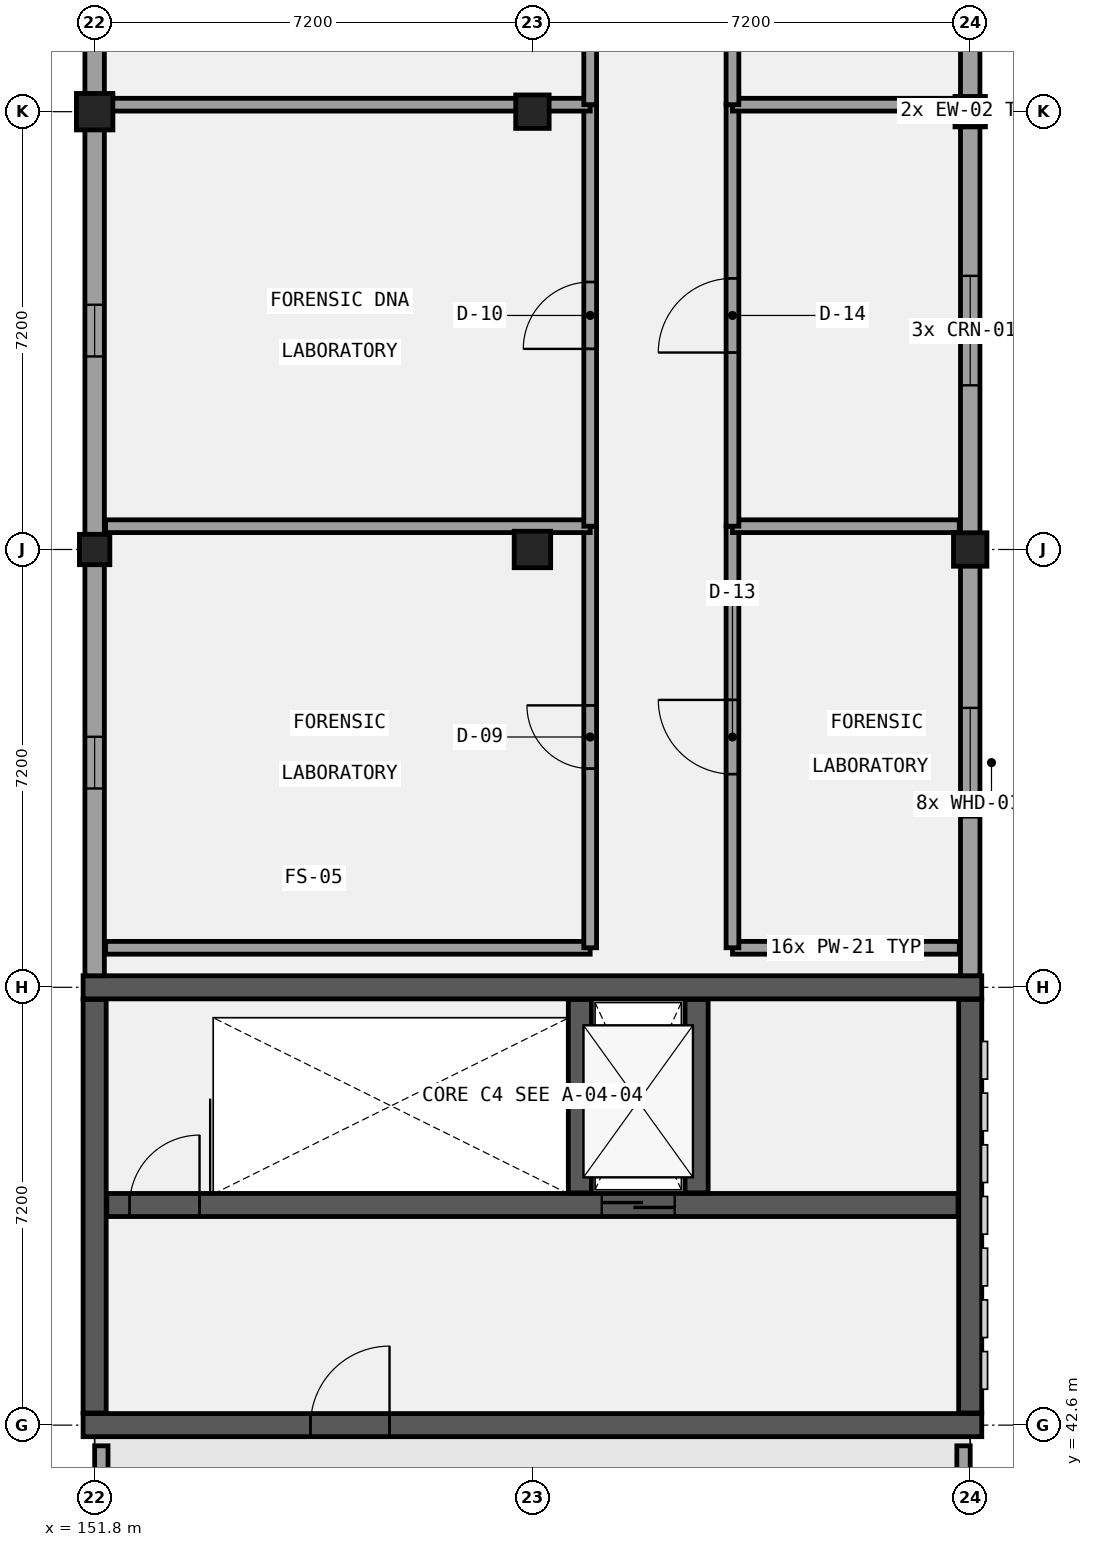
"""IFC4 building model, lengths in metres.
Left out: names, types, materials, properties, quantities, classifications, styles, units other than length and angle.
Written with IfcOpenShell. Run it as: python <this file> out.ifc"""

import sys

from ifc_helpers import new_model, si_unit, direction, frame, frame_2d, origin, origin_2d, place, context, subcontext, project, spatial, rectangle, extrude, element, fill, save


model = new_model("IFC4")
c1 = context("Model", 3, precision=1e-05, world=origin(), true_north=direction((0.0, 1.0)))
c2 = subcontext(c1, "Body", "Model", "MODEL_VIEW")
j1 = project(units=[si_unit("LENGTHUNIT", "METRE"), si_unit("PLANEANGLEUNIT", "RADIAN")], contexts=[c1])
p1 = place(None, origin())
s1 = spatial("IfcSite", under=j1, at=p1, CompositionType="ELEMENT")
p2 = place(p1, origin())
s2 = spatial("IfcBuilding", under=s1, at=p2, CompositionType="ELEMENT")
p3 = place(p2, frame((0.0, 0.0, 18.0)))
s3 = spatial("IfcBuildingStorey", under=s2, at=p3, CompositionType="ELEMENT", Elevation=18.0)
p4 = place(p3, frame((151.61, 49.8, 0.0), z_axis=(0.0, 0.0, 1.0), x_axis=(1.0, 0.0, 0.0)))
e1 = element("IfcWall", 1, at=p4, inside=s3, PredefinedType="SHEAR", context=c2, shape_type="SweptSolid", body=[
    extrude(rectangle(XDim=14.78, YDim=0.38, at=frame_2d((7.39, 0.0))), origin(), (0.0, 0.0, 1.0), 4.2),
])
p5 = place(p3, frame((151.61, 42.6, 0.0), z_axis=(0.0, 0.0, 1.0), x_axis=(1.0, 0.0, 0.0)))
e2 = element("IfcWall", 2, at=p5, inside=s3, PredefinedType="SHEAR", context=c2, shape_type="SweptSolid", body=[
    extrude(rectangle(XDim=14.78, YDim=0.38, at=frame_2d((7.39, 0.0))), origin(), (0.0, 0.0, 1.0), 4.2),
])
p6 = place(p5, frame((3.74, 0.0, 0.0)))
e3 = element("IfcOpeningElement", 3, at=p6, cuts=e2, PredefinedType="OPENING", context=c2, shape_type="SweptSolid", body=[
    extrude(rectangle(XDim=1.3, YDim=2.2, at=frame_2d((0.65, 1.1))), frame((0.0, 0.2, 0.0), z_axis=(0.0, -1.0, 0.0), x_axis=(1.0, 0.0, 0.0)), (0.0, 0.0, 1.0), 0.4),
])
for number, where, z_axis, x_axis in (
    (4, (151.8, 42.8, 0.0), (0.0, 0.0, 1.0), (0.0, 1.0, 0.0)),
    (5, (166.2, 42.8, 0.0), (0.0, 0.0, 1.0), (0.0, 1.0, 0.0)),
):
    element("IfcWall", number, at=place(p3, frame(where, z_axis=z_axis, x_axis=x_axis)), inside=s3, PredefinedType="SHEAR", context=c2, shape_type="SweptSolid", body=[
        extrude(rectangle(XDim=6.8, YDim=0.38, at=frame_2d((3.4, 0.0))), origin(), (0.0, 0.0, 1.0), 4.2),
    ])
p7 = place(p3, frame((152.0, 46.22, 0.0), z_axis=(0.0, 0.0, 1.0), x_axis=(1.0, 0.0, 0.0)))
e6 = element("IfcWall", 6, at=p7, inside=s3, PredefinedType="SHEAR", context=c2, shape_type="SweptSolid", body=[
    extrude(rectangle(XDim=14.0, YDim=0.38, at=frame_2d((7.0, 0.0))), origin(), (0.0, 0.0, 1.0), 4.2),
])
p8 = place(p7, frame((8.14, 0.0, 0.0)))
e7 = element("IfcOpeningElement", 7, at=p8, cuts=e6, PredefinedType="OPENING", context=c2, shape_type="SweptSolid", body=[
    extrude(rectangle(XDim=1.2, YDim=2.15, at=frame_2d((0.6, 1.075))), frame((0.0, 0.2, 0.0), z_axis=(0.0, -1.0, 0.0), x_axis=(1.0, 0.0, 0.0)), (0.0, 0.0, 1.0), 0.4),
])
p9 = place(p7, frame((0.375, 0.0, 0.0)))
e8 = element("IfcOpeningElement", 8, at=p9, cuts=e6, PredefinedType="OPENING", context=c2, shape_type="SweptSolid", body=[
    extrude(rectangle(XDim=1.15, YDim=2.15, at=frame_2d((0.575, 1.075))), frame((0.0, 0.2, 0.0), z_axis=(0.0, -1.0, 0.0), x_axis=(1.0, 0.0, 0.0)), (0.0, 0.0, 1.0), 0.4),
])
for number, where, z_axis, x_axis in (
    (9, (159.78, 46.42, 0.0), (0.0, 0.0, 1.0), (0.0, 1.0, 0.0)),
    (10, (161.7, 46.42, 0.0), (0.0, 0.0, 1.0), (0.0, 1.0, 0.0)),
):
    element("IfcWall", number, at=place(p3, frame(where, z_axis=z_axis, x_axis=x_axis)), inside=s3, PredefinedType="SHEAR", context=c2, shape_type="SweptSolid", body=[
        extrude(rectangle(XDim=3.18, YDim=0.38, at=frame_2d((1.59, 0.0))), origin(), (0.0, 0.0, 1.0), 4.2),
    ])
p10 = place(p3, frame((151.8, 57.0, 0.0), z_axis=(0.0, 0.0, 1.0), x_axis=(1.0, 0.0, 0.0)))
e11 = element("IfcColumn", 11, at=p10, inside=s3, PredefinedType="COLUMN", context=c2, shape_type="SweptSolid", body=[
    extrude(rectangle(XDim=0.5, YDim=0.5, at=origin_2d()), origin(), (0.0, 0.0, 1.0), 4.2),
])
for number, where, z_axis, x_axis in (
    (12, (151.8, 64.2, 0.0), (0.0, 0.0, 1.0), (1.0, 0.0, 0.0)),
    (13, (159.0, 57.0, 0.0), (0.0, 0.0, 1.0), (1.0, 0.0, 0.0)),
):
    element("IfcColumn", number, at=place(p3, frame(where, z_axis=z_axis, x_axis=x_axis)), inside=s3, PredefinedType="COLUMN", context=c2, shape_type="SweptSolid", body=[
        extrude(rectangle(XDim=0.6, YDim=0.6, at=origin_2d()), origin(), (0.0, 0.0, 1.0), 4.2),
    ])
for number, where, z_axis, x_axis in (
    (14, (159.0, 64.2, 0.0), (0.0, 0.0, 1.0), (1.0, 0.0, 0.0)),
    (15, (166.2, 57.0, 0.0), (0.0, 0.0, 1.0), (1.0, 0.0, 0.0)),
):
    element("IfcColumn", number, at=place(p3, frame(where, z_axis=z_axis, x_axis=x_axis)), inside=s3, PredefinedType="COLUMN", context=c2, shape_type="SweptSolid", body=[
        extrude(rectangle(XDim=0.55, YDim=0.55, at=origin_2d()), origin(), (0.0, 0.0, 1.0), 4.2),
    ])
p11 = place(p3, frame((166.2, 64.2, 0.0), z_axis=(0.0, 0.0, 1.0), x_axis=(1.0, 0.0, 0.0)))
e16 = element("IfcColumn", 16, at=p11, inside=s3, PredefinedType="COLUMN", context=c2, shape_type="SweptSolid", body=[
    extrude(rectangle(XDim=0.5, YDim=0.5, at=origin_2d()), origin(), (0.0, 0.0, 1.0), 4.2),
])
p12 = place(p3, frame((151.8, 78.44, 0.0), z_axis=(0.0, 0.0, 1.0), x_axis=(0.0, -1.0, 0.0)))
e17 = element("IfcWall", 17, at=p12, inside=s3, PredefinedType="SOLIDWALL", context=c2, shape_type="SweptSolid", body=[
    extrude(rectangle(XDim=28.45, YDim=0.32, at=frame_2d((14.225, 0.0))), origin(), (0.0, 0.0, 1.0), 3.19),
])
p13 = place(p12, frame((24.52, 0.0, 1.0)))
e18 = element("IfcOpeningElement", 18, at=p13, cuts=e17, PredefinedType="OPENING", context=c2, shape_type="SweptSolid", body=[
    extrude(rectangle(XDim=0.85, YDim=1.65, at=frame_2d((0.425, 0.825))), frame((0.0, 0.17, 0.0), z_axis=(0.0, -1.0, 0.0), x_axis=(1.0, 0.0, 0.0)), (0.0, 0.0, 1.0), 0.34),
])
p14 = place(p12, frame((17.415, 0.0, 1.0)))
e19 = element("IfcOpeningElement", 19, at=p14, cuts=e17, PredefinedType="OPENING", context=c2, shape_type="SweptSolid", body=[
    extrude(rectangle(XDim=0.85, YDim=1.65, at=frame_2d((0.425, 0.825))), frame((0.0, 0.17, 0.0), z_axis=(0.0, -1.0, 0.0), x_axis=(1.0, 0.0, 0.0)), (0.0, 0.0, 1.0), 0.34),
])
p15 = place(p12, frame((10.215, 0.0, 1.0)))
e20 = element("IfcOpeningElement", 20, at=p15, cuts=e17, PredefinedType="OPENING", context=c2, shape_type="SweptSolid", body=[
    extrude(rectangle(XDim=0.85, YDim=1.65, at=frame_2d((0.425, 0.825))), frame((0.0, 0.17, 0.0), z_axis=(0.0, -1.0, 0.0), x_axis=(1.0, 0.0, 0.0)), (0.0, 0.0, 1.0), 0.34),
])
p16 = place(p12, frame((3.095, 0.0, 1.0)))
e21 = element("IfcOpeningElement", 21, at=p16, cuts=e17, PredefinedType="OPENING", context=c2, shape_type="SweptSolid", body=[
    extrude(rectangle(XDim=0.85, YDim=1.65, at=frame_2d((0.425, 0.825))), frame((0.0, 0.17, 0.0), z_axis=(0.0, -1.0, 0.0), x_axis=(1.0, 0.0, 0.0)), (0.0, 0.0, 1.0), 0.34),
])
p17 = place(p3, frame((166.2, 49.99, 0.0), z_axis=(0.0, 0.0, 1.0), x_axis=(0.0, 1.0, 0.0)))
e22 = element("IfcWall", 22, at=p17, inside=s3, PredefinedType="SOLIDWALL", context=c2, shape_type="SweptSolid", body=[
    extrude(rectangle(XDim=28.45, YDim=0.32, at=frame_2d((14.225, 0.0))), origin(), (0.0, 0.0, 1.0), 3.09),
])
p18 = place(p17, frame((2.605, 0.0, 1.0)))
e23 = element("IfcOpeningElement", 23, at=p18, cuts=e22, PredefinedType="OPENING", context=c2, shape_type="SweptSolid", body=[
    extrude(rectangle(XDim=1.8, YDim=1.4, at=frame_2d((0.9, 0.7))), frame((0.0, 0.17, 0.0), z_axis=(0.0, -1.0, 0.0), x_axis=(1.0, 0.0, 0.0)), (0.0, 0.0, 1.0), 0.34),
])
p19 = place(p17, frame((9.71, 0.0, 1.0)))
e24 = element("IfcOpeningElement", 24, at=p19, cuts=e22, PredefinedType="OPENING", context=c2, shape_type="SweptSolid", body=[
    extrude(rectangle(XDim=1.8, YDim=1.4, at=frame_2d((0.9, 0.7))), frame((0.0, 0.17, 0.0), z_axis=(0.0, -1.0, 0.0), x_axis=(1.0, 0.0, 0.0)), (0.0, 0.0, 1.0), 0.34),
])
p20 = place(p17, frame((16.91, 0.0, 1.0)))
e25 = element("IfcOpeningElement", 25, at=p20, cuts=e22, PredefinedType="OPENING", context=c2, shape_type="SweptSolid", body=[
    extrude(rectangle(XDim=1.8, YDim=1.4, at=frame_2d((0.9, 0.7))), frame((0.0, 0.17, 0.0), z_axis=(0.0, -1.0, 0.0), x_axis=(1.0, 0.0, 0.0)), (0.0, 0.0, 1.0), 0.34),
])
p21 = place(p17, frame((24.03, 0.0, 1.0)))
e26 = element("IfcOpeningElement", 26, at=p21, cuts=e22, PredefinedType="OPENING", context=c2, shape_type="SweptSolid", body=[
    extrude(rectangle(XDim=1.8, YDim=1.4, at=frame_2d((0.9, 0.7))), frame((0.0, 0.17, 0.0), z_axis=(0.0, -1.0, 0.0), x_axis=(1.0, 0.0, 0.0)), (0.0, 0.0, 1.0), 0.34),
])
for number, where, z_axis, x_axis in (
    (27, (166.09, 42.26, 0.0), (0.0, 0.0, 1.0), (0.0, -1.0, 0.0)),
    (28, (151.91, 35.63, 0.0), (0.0, 0.0, 1.0), (0.0, 1.0, 0.0)),
):
    element("IfcWall", number, at=place(p3, frame(where, z_axis=z_axis, x_axis=x_axis)), inside=s3, PredefinedType="PARAPET", context=c2, shape_type="SweptSolid", body=[
        extrude(rectangle(XDim=6.63, YDim=0.22, at=frame_2d((3.315, 0.0))), origin(), (0.0, 0.0, 1.0), 1.12),
    ])
p22 = place(p3, frame((151.98, 50.45, 0.0), z_axis=(0.0, 0.0, 1.0), x_axis=(1.0, 0.0, 0.0)))
e29 = element("IfcWall", 29, at=p22, inside=s3, PredefinedType="PARTITIONING", context=c2, shape_type="SweptSolid", body=[
    extrude(rectangle(XDim=7.97, YDim=0.21, at=frame_2d((3.985, 0.0))), origin(), (0.0, 0.0, 1.0), 3.94),
])
p23 = place(p3, frame((159.95, 50.45, 0.0), z_axis=(0.0, 0.0, 1.0), x_axis=(0.0, 1.0, 0.0)))
e30 = element("IfcWall", 30, at=p23, inside=s3, PredefinedType="PARTITIONING", context=c2, shape_type="SweptSolid", body=[
    extrude(rectangle(XDim=6.933, YDim=0.21, at=frame_2d((3.467, 0.0))), origin(), (0.0, 0.0, 1.0), 3.94),
])
p24 = place(p23, frame((2.947, 0.0, 0.0)))
e31 = element("IfcOpeningElement", 31, at=p24, cuts=e30, PredefinedType="OPENING", context=c2, shape_type="SweptSolid", body=[
    extrude(rectangle(XDim=1.04, YDim=2.35, at=frame_2d((0.52, 1.175))), frame((0.0, 0.115, 0.0), z_axis=(0.0, -1.0, 0.0), x_axis=(1.0, 0.0, 0.0)), (0.0, 0.0, 1.0), 0.23),
])
p25 = place(p3, frame((151.98, 57.383, 0.0), z_axis=(0.0, 0.0, 1.0), x_axis=(1.0, 0.0, 0.0)))
e32 = element("IfcWall", 32, at=p25, inside=s3, PredefinedType="PARTITIONING", context=c2, shape_type="SweptSolid", body=[
    extrude(rectangle(XDim=7.97, YDim=0.21, at=frame_2d((3.985, 0.0))), origin(), (0.0, 0.0, 1.0), 2.94),
])
p26 = place(p3, frame((159.95, 57.383, 0.0), z_axis=(0.0, 0.0, 1.0), x_axis=(0.0, 1.0, 0.0)))
e33 = element("IfcWall", 33, at=p26, inside=s3, PredefinedType="PARTITIONING", context=c2, shape_type="SweptSolid", body=[
    extrude(rectangle(XDim=6.932, YDim=0.21, at=frame_2d((3.466, 0.0))), origin(), (0.0, 0.0, 1.0), 3.94),
])
p27 = place(p26, frame((2.916, 0.0, 0.0)))
e34 = element("IfcOpeningElement", 34, at=p27, cuts=e33, PredefinedType="OPENING", context=c2, shape_type="SweptSolid", body=[
    extrude(rectangle(XDim=1.1, YDim=2.1, at=frame_2d((0.55, 1.05))), frame((0.0, 0.115, 0.0), z_axis=(0.0, -1.0, 0.0), x_axis=(1.0, 0.0, 0.0)), (0.0, 0.0, 1.0), 0.23),
])
p28 = place(p3, frame((151.98, 64.315, 0.0), z_axis=(0.0, 0.0, 1.0), x_axis=(1.0, 0.0, 0.0)))
e35 = element("IfcWall", 35, at=p28, inside=s3, PredefinedType="PARTITIONING", context=c2, shape_type="SweptSolid", body=[
    extrude(rectangle(XDim=7.97, YDim=0.21, at=frame_2d((3.985, 0.0))), origin(), (0.0, 0.0, 1.0), 3.34),
])
p29 = place(p3, frame((159.95, 64.315, 0.0), z_axis=(0.0, 0.0, 1.0), x_axis=(0.0, 1.0, 0.0)))
e36 = element("IfcWall", 36, at=p29, inside=s3, PredefinedType="PARTITIONING", context=c2, shape_type="SweptSolid", body=[
    extrude(rectangle(XDim=6.933, YDim=0.21, at=frame_2d((3.467, 0.0))), origin(), (0.0, 0.0, 1.0), 3.94),
])
p30 = place(p29, frame((2.917, 0.0, 0.0)))
e37 = element("IfcOpeningElement", 37, at=p30, cuts=e36, PredefinedType="OPENING", context=c2, shape_type="SweptSolid", body=[
    extrude(rectangle(XDim=1.1, YDim=2.22, at=frame_2d((0.55, 1.11))), frame((0.0, 0.115, 0.0), z_axis=(0.0, -1.0, 0.0), x_axis=(1.0, 0.0, 0.0)), (0.0, 0.0, 1.0), 0.23),
])
p31 = place(p3, frame((162.29, 50.45, 0.0), z_axis=(0.0, 0.0, 1.0), x_axis=(1.0, 0.0, 0.0)))
e38 = element("IfcWall", 38, at=p31, inside=s3, PredefinedType="PARTITIONING", context=c2, shape_type="SweptSolid", body=[
    extrude(rectangle(XDim=3.73, YDim=0.21, at=frame_2d((1.865, 0.0))), origin(), (0.0, 0.0, 1.0), 3.94),
])
p32 = place(p3, frame((162.29, 50.45, 0.0), z_axis=(0.0, 0.0, 1.0), x_axis=(0.0, 1.0, 0.0)))
e39 = element("IfcWall", 39, at=p32, inside=s3, PredefinedType="PARTITIONING", context=c2, shape_type="SweptSolid", body=[
    extrude(rectangle(XDim=6.933, YDim=0.21, at=frame_2d((3.467, 0.0))), origin(), (0.0, 0.0, 1.0), 3.94),
])
p33 = place(p32, frame((2.856, 0.0, 0.0)))
e40 = element("IfcOpeningElement", 40, at=p33, cuts=e39, PredefinedType="OPENING", context=c2, shape_type="SweptSolid", body=[
    extrude(rectangle(XDim=1.22, YDim=2.1, at=frame_2d((0.61, 1.05))), frame((0.0, 0.115, 0.0), z_axis=(0.0, -1.0, 0.0), x_axis=(1.0, 0.0, 0.0)), (0.0, 0.0, 1.0), 0.23),
])
p34 = place(p3, frame((162.29, 57.383, 0.0), z_axis=(0.0, 0.0, 1.0), x_axis=(1.0, 0.0, 0.0)))
e41 = element("IfcWall", 41, at=p34, inside=s3, PredefinedType="PARTITIONING", context=c2, shape_type="SweptSolid", body=[
    extrude(rectangle(XDim=3.73, YDim=0.21, at=frame_2d((1.865, 0.0))), origin(), (0.0, 0.0, 1.0), 3.94),
])
p35 = place(p3, frame((162.29, 57.383, 0.0), z_axis=(0.0, 0.0, 1.0), x_axis=(0.0, 1.0, 0.0)))
e42 = element("IfcWall", 42, at=p35, inside=s3, PredefinedType="PARTITIONING", context=c2, shape_type="SweptSolid", body=[
    extrude(rectangle(XDim=6.932, YDim=0.21, at=frame_2d((3.466, 0.0))), origin(), (0.0, 0.0, 1.0), 3.94),
])
p36 = place(p35, frame((2.856, 0.0, 0.0)))
e43 = element("IfcOpeningElement", 43, at=p36, cuts=e42, PredefinedType="OPENING", context=c2, shape_type="SweptSolid", body=[
    extrude(rectangle(XDim=1.22, YDim=2.22, at=frame_2d((0.61, 1.11))), frame((0.0, 0.115, 0.0), z_axis=(0.0, -1.0, 0.0), x_axis=(1.0, 0.0, 0.0)), (0.0, 0.0, 1.0), 0.23),
])
p37 = place(p3, frame((162.29, 64.315, 0.0), z_axis=(0.0, 0.0, 1.0), x_axis=(1.0, 0.0, 0.0)))
e44 = element("IfcWall", 44, at=p37, inside=s3, PredefinedType="PARTITIONING", context=c2, shape_type="SweptSolid", body=[
    extrude(rectangle(XDim=3.73, YDim=0.21, at=frame_2d((1.865, 0.0))), origin(), (0.0, 0.0, 1.0), 3.34),
])
p38 = place(p3, frame((162.29, 64.315, 0.0), z_axis=(0.0, 0.0, 1.0), x_axis=(0.0, 1.0, 0.0)))
e45 = element("IfcWall", 45, at=p38, inside=s3, PredefinedType="PARTITIONING", context=c2, shape_type="SweptSolid", body=[
    extrude(rectangle(XDim=6.933, YDim=0.21, at=frame_2d((3.467, 0.0))), origin(), (0.0, 0.0, 1.0), 3.94),
])
p39 = place(p38, frame((2.856, 0.0, 0.0)))
e46 = element("IfcOpeningElement", 46, at=p39, cuts=e45, PredefinedType="OPENING", context=c2, shape_type="SweptSolid", body=[
    extrude(rectangle(XDim=1.22, YDim=2.35, at=frame_2d((0.61, 1.175))), frame((0.0, 0.115, 0.0), z_axis=(0.0, -1.0, 0.0), x_axis=(1.0, 0.0, 0.0)), (0.0, 0.0, 1.0), 0.23),
])
p40 = place(p8, frame((1.2, 0.0, 0.0), z_axis=(0.0, 0.0, 1.0), x_axis=(-1.0, 0.0, 0.0)))
e47 = element("IfcDoor", 47, at=p40, inside=s3, OperationType="DOUBLE_DOOR_SLIDING", PredefinedType="DOOR", context=c2, shape_type="SweptSolid", body=[
    extrude(rectangle(XDim=1.2, YDim=2.15, at=frame_2d((0.6, 1.075))), frame((0.0, 0.025, 0.0), z_axis=(0.0, -1.0, 0.0), x_axis=(1.0, 0.0, 0.0)), (0.0, 0.0, 1.0), 0.05),
])
fill(e7, e47)
p41 = place(p9, origin())
e48 = element("IfcDoor", 48, at=p41, inside=s3, OperationType="SINGLE_SWING_RIGHT", PredefinedType="DOOR", context=c2, shape_type="SweptSolid", body=[
    extrude(rectangle(XDim=1.15, YDim=2.15, at=frame_2d((0.575, 1.075))), frame((0.0, 0.025, 0.0), z_axis=(0.0, -1.0, 0.0), x_axis=(1.0, 0.0, 0.0)), (0.0, 0.0, 1.0), 0.05),
])
fill(e8, e48)
p42 = place(p6, frame((1.3, 0.0, 0.0), z_axis=(0.0, 0.0, 1.0), x_axis=(-1.0, 0.0, 0.0)))
e49 = element("IfcDoor", 49, at=p42, inside=s3, OperationType="SINGLE_SWING_RIGHT", PredefinedType="DOOR", context=c2, shape_type="SweptSolid", body=[
    extrude(rectangle(XDim=1.3, YDim=2.2, at=frame_2d((0.65, 1.1))), frame((0.0, 0.025, 0.0), z_axis=(0.0, -1.0, 0.0), x_axis=(1.0, 0.0, 0.0)), (0.0, 0.0, 1.0), 0.05),
])
fill(e3, e49)
p43 = place(p13, origin())
e50 = element("IfcWindow", 50, at=p43, inside=s3, PartitioningType="SINGLE_PANEL", PredefinedType="WINDOW", context=c2, shape_type="SweptSolid", body=[
    extrude(rectangle(XDim=0.85, YDim=1.65, at=frame_2d((0.425, 0.825))), frame((0.0, 0.03, 0.0), z_axis=(0.0, -1.0, 0.0), x_axis=(1.0, 0.0, 0.0)), (0.0, 0.0, 1.0), 0.06),
])
fill(e18, e50)
p44 = place(p14, origin())
e51 = element("IfcWindow", 51, at=p44, inside=s3, PartitioningType="SINGLE_PANEL", PredefinedType="WINDOW", context=c2, shape_type="SweptSolid", body=[
    extrude(rectangle(XDim=0.85, YDim=1.65, at=frame_2d((0.425, 0.825))), frame((0.0, 0.03, 0.0), z_axis=(0.0, -1.0, 0.0), x_axis=(1.0, 0.0, 0.0)), (0.0, 0.0, 1.0), 0.06),
])
fill(e19, e51)
p45 = place(p18, origin())
e52 = element("IfcWindow", 52, at=p45, inside=s3, PartitioningType="SINGLE_PANEL", PredefinedType="WINDOW", context=c2, shape_type="SweptSolid", body=[
    extrude(rectangle(XDim=1.8, YDim=1.4, at=frame_2d((0.9, 0.7))), frame((0.0, 0.03, 0.0), z_axis=(0.0, -1.0, 0.0), x_axis=(1.0, 0.0, 0.0)), (0.0, 0.0, 1.0), 0.06),
])
fill(e23, e52)
p46 = place(p19, origin())
e53 = element("IfcWindow", 53, at=p46, inside=s3, PartitioningType="SINGLE_PANEL", PredefinedType="WINDOW", context=c2, shape_type="SweptSolid", body=[
    extrude(rectangle(XDim=1.8, YDim=1.4, at=frame_2d((0.9, 0.7))), frame((0.0, 0.03, 0.0), z_axis=(0.0, -1.0, 0.0), x_axis=(1.0, 0.0, 0.0)), (0.0, 0.0, 1.0), 0.06),
])
fill(e24, e53)
p47 = place(p24, frame((1.04, 0.0, 0.0), z_axis=(0.0, 0.0, 1.0), x_axis=(-1.0, 0.0, 0.0)))
e54 = element("IfcDoor", 54, at=p47, inside=s3, OperationType="SINGLE_SWING_RIGHT", PredefinedType="DOOR", context=c2, shape_type="SweptSolid", body=[
    extrude(rectangle(XDim=1.04, YDim=2.35, at=frame_2d((0.52, 1.175))), frame((0.0, 0.025, 0.0), z_axis=(0.0, -1.0, 0.0), x_axis=(1.0, 0.0, 0.0)), (0.0, 0.0, 1.0), 0.05),
])
fill(e31, e54)
p48 = place(p27, frame((1.1, 0.0, 0.0), z_axis=(0.0, 0.0, 1.0), x_axis=(-1.0, 0.0, 0.0)))
e55 = element("IfcDoor", 55, at=p48, inside=s3, OperationType="SINGLE_SWING_LEFT", PredefinedType="DOOR", context=c2, shape_type="SweptSolid", body=[
    extrude(rectangle(XDim=1.1, YDim=2.1, at=frame_2d((0.55, 1.05))), frame((0.0, 0.025, 0.0), z_axis=(0.0, -1.0, 0.0), x_axis=(1.0, 0.0, 0.0)), (0.0, 0.0, 1.0), 0.05),
])
fill(e34, e55)
p49 = place(p33, origin())
e56 = element("IfcDoor", 56, at=p49, inside=s3, OperationType="SINGLE_SWING_RIGHT", PredefinedType="DOOR", context=c2, shape_type="SweptSolid", body=[
    extrude(rectangle(XDim=1.22, YDim=2.1, at=frame_2d((0.61, 1.05))), frame((0.0, 0.025, 0.0), z_axis=(0.0, -1.0, 0.0), x_axis=(1.0, 0.0, 0.0)), (0.0, 0.0, 1.0), 0.05),
])
fill(e40, e56)
p50 = place(p36, origin())
e57 = element("IfcDoor", 57, at=p50, inside=s3, OperationType="SINGLE_SWING_LEFT", PredefinedType="DOOR", context=c2, shape_type="SweptSolid", body=[
    extrude(rectangle(XDim=1.22, YDim=2.22, at=frame_2d((0.61, 1.11))), frame((0.0, 0.025, 0.0), z_axis=(0.0, -1.0, 0.0), x_axis=(1.0, 0.0, 0.0)), (0.0, 0.0, 1.0), 0.05),
])
fill(e43, e57)
save(model, sys.argv[1])
